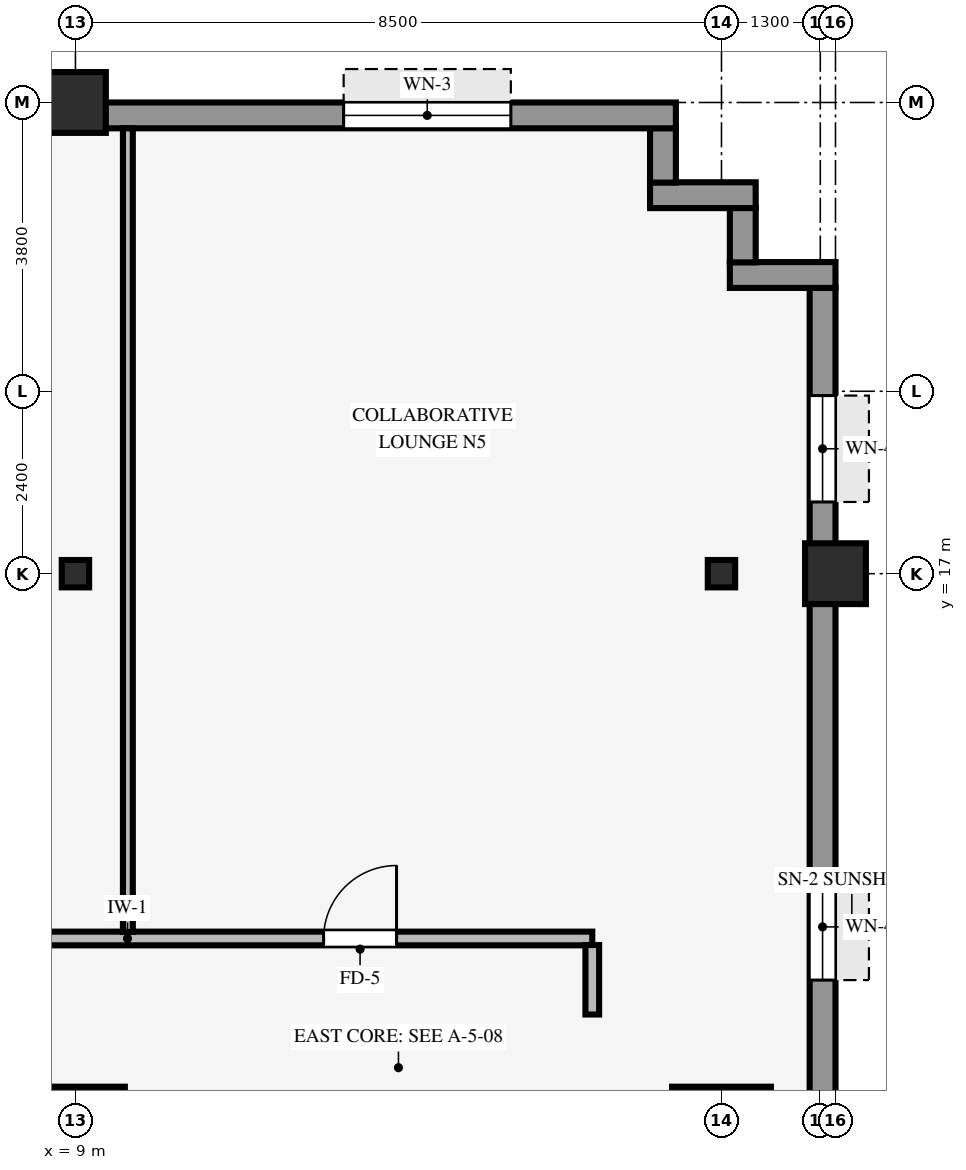
"""IFC4 building model, lengths in metres.
Left out: names, types, materials, properties, quantities, classifications, styles, units other than length and angle.
Written with IfcOpenShell. Run it as: python <this file> out.ifc"""

import sys

from ifc_helpers import new_model, si_unit, direction, frame, frame_2d, origin, origin_2d, place, context, subcontext, project, spatial, rectangle, hollow_rectangle, i_section, extrude, source, transform, mapped, element, fill, save


model = new_model("IFC4")
c1 = context("Model", 3, precision=1e-05, world=origin(), true_north=direction((0.0, 1.0)))
c2 = subcontext(c1, "Body", "Model", "MODEL_VIEW")
j1 = project(units=[si_unit("LENGTHUNIT", "METRE"), si_unit("PLANEANGLEUNIT", "RADIAN")], contexts=[c1])
p1 = place(None, origin())
s1 = spatial("IfcSite", under=j1, at=p1, CompositionType="ELEMENT")
p2 = place(p1, origin())
s2 = spatial("IfcBuilding", under=s1, at=p2, CompositionType="ELEMENT")
p3 = place(p2, frame((0.0, 0.0, 42.2)))
s3 = spatial("IfcBuildingStorey", under=s2, at=p3, CompositionType="ELEMENT", Elevation=42.2)
for number, where, z_axis, x_axis in (
    (1, (9.0, 9.6, 0.0), (0.0, 0.0, 1.0), (1.0, 0.0, 0.0)),
    (2, (17.5, 9.6, 0.0), (0.0, 0.0, 1.0), (1.0, 0.0, 0.0)),
):
    element("IfcColumn", number, at=place(p3, frame(where, z_axis=z_axis, x_axis=x_axis)), inside=s3, PredefinedType="COLUMN", context=c2, shape_type="SweptSolid", body=[
        extrude(rectangle(XDim=1.3, YDim=1.3, at=origin_2d()), origin(), (0.0, 0.0, 1.0), 3.37),
    ])
for number, where, z_axis, x_axis in (
    (3, (19.0, 17.0, 0.0), (0.0, 0.0, 1.0), (1.0, 0.0, 0.0)),
    (4, (9.0, 23.2, 0.0), (0.0, 0.0, 1.0), (1.0, 0.0, 0.0)),
):
    element("IfcColumn", number, at=place(p3, frame(where, z_axis=z_axis, x_axis=x_axis)), inside=s3, PredefinedType="COLUMN", context=c2, shape_type="SweptSolid", body=[
        extrude(hollow_rectangle(XDim=0.8, YDim=0.8, WallThickness=0.055, InnerFilletRadius=0.055, OuterFilletRadius=0.11, at=origin_2d()), origin(), (0.0, 0.0, 1.0), 3.37),
    ])
for number, where, z_axis, x_axis in (
    (5, (9.0, 17.0, 0.0), (0.0, 0.0, 1.0), (1.0, 0.0, 0.0)),
    (6, (17.5, 17.0, 0.0), (0.0, 0.0, 1.0), (1.0, 0.0, 0.0)),
):
    element("IfcColumn", number, at=place(p3, frame(where, z_axis=z_axis, x_axis=x_axis)), inside=s3, PredefinedType="COLUMN", context=c2, shape_type="SweptSolid", body=[
        extrude(i_section(OverallWidth=0.36, OverallDepth=0.36, WebThickness=0.021, FlangeThickness=0.021, FilletRadius=0.018, at=origin_2d()), origin(), (0.0, 0.0, 1.0), 3.37),
    ])
p4 = place(p3, frame((18.83, -20.764, 0.0), z_axis=(0.0, 0.0, 1.0), x_axis=(0.0, 1.0, 0.0)))
e7 = element("IfcWall", 7, at=p4, inside=s3, PredefinedType="STANDARD", context=c2, shape_type="SweptSolid", body=[
    extrude(rectangle(XDim=41.528, YDim=0.34, at=frame_2d((20.764, 0.0))), origin(), (0.0, 0.0, 1.0), 2.705),
])
p5 = place(p4, frame((7.914, 0.0, 0.0), z_axis=(0.0, 0.0, 1.0), x_axis=(-1.0, 0.0, 0.0)))
e8 = element("IfcOpeningElement", 8, at=p5, cuts=e7, PredefinedType="OPENING", context=c2, shape_type="SweptSolid", body=[
    extrude(rectangle(XDim=1.05, YDim=2.1, at=frame_2d((0.525, 1.05))), frame((0.0, 0.18, 0.0), z_axis=(0.0, -1.0, 0.0), x_axis=(1.0, 0.0, 0.0)), (0.0, 0.0, 1.0), 0.36),
])
p6 = place(p4, frame((1.42, 0.0, 0.8)))
e9 = element("IfcOpeningElement", 9, at=p6, cuts=e7, PredefinedType="OPENING", context=c2, shape_type="SweptSolid", body=[
    extrude(rectangle(XDim=1.4, YDim=1.65, at=frame_2d((0.7, 0.825))), frame((0.0, 0.18, 0.0), z_axis=(0.0, -1.0, 0.0), x_axis=(1.0, 0.0, 0.0)), (0.0, 0.0, 1.0), 0.36),
])
p7 = place(p4, frame((32.417, 0.0, 0.8)))
e10 = element("IfcOpeningElement", 10, at=p7, cuts=e7, PredefinedType="OPENING", context=c2, shape_type="SweptSolid", body=[
    extrude(rectangle(XDim=1.4, YDim=1.65, at=frame_2d((0.7, 0.825))), frame((0.0, 0.18, 0.0), z_axis=(0.0, -1.0, 0.0), x_axis=(1.0, 0.0, 0.0)), (0.0, 0.0, 1.0), 0.36),
])
p8 = place(p4, frame((38.708, 0.0, 0.8)))
e11 = element("IfcOpeningElement", 11, at=p8, cuts=e7, PredefinedType="OPENING", context=c2, shape_type="SweptSolid", body=[
    extrude(rectangle(XDim=1.4, YDim=1.65, at=frame_2d((0.7, 0.825))), frame((0.0, 0.18, 0.0), z_axis=(0.0, -1.0, 0.0), x_axis=(1.0, 0.0, 0.0)), (0.0, 0.0, 1.0), 0.36),
])
p9 = place(p3, frame((17.61, 20.93, 0.0), z_axis=(0.0, 0.0, 1.0), x_axis=(1.0, 0.0, 0.0)))
e12 = element("IfcWall", 12, at=p9, inside=s3, PredefinedType="STANDARD", context=c2, shape_type="SweptSolid", body=[
    extrude(rectangle(XDim=1.39, YDim=0.34, at=frame_2d((0.695, 0.0))), origin(), (0.0, 0.0, 1.0), 3.36),
])
p10 = place(p3, frame((17.78, 21.096, 0.0), z_axis=(0.0, 0.0, 1.0), x_axis=(0.0, 1.0, 0.0)))
e13 = element("IfcWall", 13, at=p10, inside=s3, PredefinedType="STANDARD", context=c2, shape_type="SweptSolid", body=[
    extrude(rectangle(XDim=0.718, YDim=0.34, at=frame_2d((0.359, 0.0))), origin(), (0.0, 0.0, 1.0), 3.36),
])
p11 = place(p3, frame((16.56, 21.98, 0.0), z_axis=(0.0, 0.0, 1.0), x_axis=(1.0, 0.0, 0.0)))
e14 = element("IfcWall", 14, at=p11, inside=s3, PredefinedType="STANDARD", context=c2, shape_type="SweptSolid", body=[
    extrude(rectangle(XDim=1.39, YDim=0.34, at=frame_2d((0.695, 0.0))), origin(), (0.0, 0.0, 1.0), 3.36),
])
p12 = place(p3, frame((16.73, 22.146, 0.0), z_axis=(0.0, 0.0, 1.0), x_axis=(0.0, 1.0, 0.0)))
e15 = element("IfcWall", 15, at=p12, inside=s3, PredefinedType="STANDARD", context=c2, shape_type="SweptSolid", body=[
    extrude(rectangle(XDim=0.718, YDim=0.34, at=frame_2d((0.359, 0.0))), origin(), (0.0, 0.0, 1.0), 3.36),
])
p13 = place(p3, frame((-16.9, 23.03, 0.0), z_axis=(0.0, 0.0, 1.0), x_axis=(1.0, 0.0, 0.0)))
e16 = element("IfcWall", 16, at=p13, inside=s3, PredefinedType="STANDARD", context=c2, shape_type="SweptSolid", body=[
    extrude(rectangle(XDim=33.8, YDim=0.34, at=frame_2d((16.9, 0.0))), origin(), (0.0, 0.0, 1.0), 2.705),
])
p14 = place(p13, frame((1.271, 0.0, 0.8)))
e17 = element("IfcOpeningElement", 17, at=p14, cuts=e16, PredefinedType="OPENING", context=c2, shape_type="SweptSolid", body=[
    extrude(rectangle(XDim=2.2, YDim=1.65, at=frame_2d((1.1, 0.825))), frame((0.0, 0.18, 0.0), z_axis=(0.0, -1.0, 0.0), x_axis=(1.0, 0.0, 0.0)), (0.0, 0.0, 1.0), 0.36),
])
p15 = place(p13, frame((11.257, 0.0, 0.8)))
e18 = element("IfcOpeningElement", 18, at=p15, cuts=e16, PredefinedType="OPENING", context=c2, shape_type="SweptSolid", body=[
    extrude(rectangle(XDim=2.2, YDim=1.65, at=frame_2d((1.1, 0.825))), frame((0.0, 0.18, 0.0), z_axis=(0.0, -1.0, 0.0), x_axis=(1.0, 0.0, 0.0)), (0.0, 0.0, 1.0), 0.36),
])
p16 = place(p13, frame((20.793, 0.0, 0.8)))
e19 = element("IfcOpeningElement", 19, at=p16, cuts=e16, PredefinedType="OPENING", context=c2, shape_type="SweptSolid", body=[
    extrude(rectangle(XDim=2.2, YDim=1.65, at=frame_2d((1.1, 0.825))), frame((0.0, 0.18, 0.0), z_axis=(0.0, -1.0, 0.0), x_axis=(1.0, 0.0, 0.0)), (0.0, 0.0, 1.0), 0.36),
])
p17 = place(p13, frame((29.429, 0.0, 0.8)))
e20 = element("IfcOpeningElement", 20, at=p17, cuts=e16, PredefinedType="OPENING", context=c2, shape_type="SweptSolid", body=[
    extrude(rectangle(XDim=2.2, YDim=1.65, at=frame_2d((1.1, 0.825))), frame((0.0, 0.18, 0.0), z_axis=(0.0, -1.0, 0.0), x_axis=(1.0, 0.0, 0.0)), (0.0, 0.0, 1.0), 0.36),
])
p18 = place(p3, frame((-15.8, 12.2, 0.0), z_axis=(0.0, 0.0, 1.0), x_axis=(1.0, 0.0, 0.0)))
e21 = element("IfcWall", 21, at=p18, inside=s3, PredefinedType="PARTITIONING", context=c2, shape_type="SweptSolid", body=[
    extrude(rectangle(XDim=31.6, YDim=0.18, at=frame_2d((15.8, 0.0))), origin(), (0.0, 0.0, 1.0), 3.36),
])
p19 = place(p18, frame((21.945, 0.0, 0.0)))
e22 = element("IfcOpeningElement", 22, at=p19, cuts=e21, PredefinedType="OPENING", context=c2, shape_type="SweptSolid", body=[
    extrude(rectangle(XDim=0.96, YDim=2.1, at=frame_2d((0.48, 1.05))), frame((0.0, 0.1, 0.0), z_axis=(0.0, -1.0, 0.0), x_axis=(1.0, 0.0, 0.0)), (0.0, 0.0, 1.0), 0.2),
])
p20 = place(p18, frame((28.065, 0.0, 0.0)))
e23 = element("IfcOpeningElement", 23, at=p20, cuts=e21, PredefinedType="OPENING", context=c2, shape_type="SweptSolid", body=[
    extrude(rectangle(XDim=0.96, YDim=2.1, at=frame_2d((0.48, 1.05))), frame((0.0, 0.1, 0.0), z_axis=(0.0, -1.0, 0.0), x_axis=(1.0, 0.0, 0.0)), (0.0, 0.0, 1.0), 0.2),
])
p21 = place(p18, frame((16.7, 0.0, 0.0)))
e24 = element("IfcOpeningElement", 24, at=p21, cuts=e21, PredefinedType="OPENING", context=c2, shape_type="SweptSolid", body=[
    extrude(rectangle(XDim=0.96, YDim=2.1, at=frame_2d((0.48, 1.05))), frame((0.0, 0.1, 0.0), z_axis=(0.0, -1.0, 0.0), x_axis=(1.0, 0.0, 0.0)), (0.0, 0.0, 1.0), 0.2),
])
p22 = place(p18, frame((0.92, 0.0, 0.0)))
e25 = element("IfcOpeningElement", 25, at=p22, cuts=e21, PredefinedType="OPENING", context=c2, shape_type="SweptSolid", body=[
    extrude(rectangle(XDim=0.96, YDim=2.1, at=frame_2d((0.48, 1.05))), frame((0.0, 0.1, 0.0), z_axis=(0.0, -1.0, 0.0), x_axis=(1.0, 0.0, 0.0)), (0.0, 0.0, 1.0), 0.2),
])
p23 = place(p18, frame((6.25, 0.0, 0.0)))
e26 = element("IfcOpeningElement", 26, at=p23, cuts=e21, PredefinedType="OPENING", context=c2, shape_type="SweptSolid", body=[
    extrude(rectangle(XDim=0.9, YDim=2.1, at=frame_2d((0.45, 1.05))), frame((0.0, 0.1, 0.0), z_axis=(0.0, -1.0, 0.0), x_axis=(1.0, 0.0, 0.0)), (0.0, 0.0, 1.0), 0.2),
])
p24 = place(p18, frame((3.65, 0.0, 0.0)))
e27 = element("IfcOpeningElement", 27, at=p24, cuts=e21, PredefinedType="OPENING", context=c2, shape_type="SweptSolid", body=[
    extrude(rectangle(XDim=0.9, YDim=2.1, at=frame_2d((0.45, 1.05))), frame((0.0, 0.1, 0.0), z_axis=(0.0, -1.0, 0.0), x_axis=(1.0, 0.0, 0.0)), (0.0, 0.0, 1.0), 0.2),
])
p25 = place(p18, frame((13.32, 0.0, 0.0)))
e28 = element("IfcOpeningElement", 28, at=p25, cuts=e21, PredefinedType="OPENING", context=c2, shape_type="SweptSolid", body=[
    extrude(rectangle(XDim=0.96, YDim=2.1, at=frame_2d((0.48, 1.05))), frame((0.0, 0.1, 0.0), z_axis=(0.0, -1.0, 0.0), x_axis=(1.0, 0.0, 0.0)), (0.0, 0.0, 1.0), 0.2),
])
p26 = place(p18, frame((8.75, 0.0, 0.0)))
e29 = element("IfcOpeningElement", 29, at=p26, cuts=e21, PredefinedType="OPENING", context=c2, shape_type="SweptSolid", body=[
    extrude(rectangle(XDim=0.9, YDim=2.1, at=frame_2d((0.45, 1.05))), frame((0.0, 0.1, 0.0), z_axis=(0.0, -1.0, 0.0), x_axis=(1.0, 0.0, 0.0)), (0.0, 0.0, 1.0), 0.2),
])
p27 = place(p3, frame((9.69, 12.286, 0.0), z_axis=(0.0, 0.0, 1.0), x_axis=(0.0, 1.0, 0.0)))
e30 = element("IfcWall", 30, at=p27, inside=s3, PredefinedType="PARTITIONING", context=c2, shape_type="SweptSolid", body=[
    extrude(rectangle(XDim=10.574, YDim=0.13, at=frame_2d((5.287, 0.0))), origin(), (0.0, 0.0, 1.0), 3.36),
])
p28 = place(p3, frame((15.8, 11.2, 0.0), z_axis=(0.0, 0.0, 1.0), x_axis=(0.0, 1.0, 0.0)))
e31 = element("IfcWall", 31, at=p28, inside=s3, PredefinedType="PARTITIONING", context=c2, shape_type="SweptSolid", body=[
    extrude(rectangle(XDim=0.914, YDim=0.18, at=frame_2d((0.457, 0.0))), origin(), (0.0, 0.0, 1.0), 3.36),
])
m1 = source(origin(), c2, "Body", "SweptSolid", [
    extrude(rectangle(XDim=1.4, YDim=1.65, at=frame_2d((0.7, 0.825))), frame((0.0, 0.03, 0.0), z_axis=(0.0, -1.0, 0.0), x_axis=(1.0, 0.0, 0.0)), (0.0, 0.0, 1.0), 0.06),
])
p29 = place(p7, origin())
e32 = element("IfcWindow", 32, at=p29, inside=s3, PartitioningType="SINGLE_PANEL", PredefinedType="WINDOW", context=c2, shape_type="MappedRepresentation", body=[
    mapped(m1, transform((0.0, 0.0, 0.0), scale=1.0)),
])
fill(e10, e32)
p30 = place(p8, origin())
e33 = element("IfcWindow", 33, at=p30, inside=s3, PartitioningType="SINGLE_PANEL", PredefinedType="WINDOW", context=c2, shape_type="MappedRepresentation", body=[
    mapped(m1, transform((0.0, 0.0, 0.0), scale=1.0)),
])
fill(e11, e33)
m2 = source(origin(), c2, "Body", "SweptSolid", [
    extrude(rectangle(XDim=2.2, YDim=1.65, at=frame_2d((1.1, 0.825))), frame((0.0, 0.03, 0.0), z_axis=(0.0, -1.0, 0.0), x_axis=(1.0, 0.0, 0.0)), (0.0, 0.0, 1.0), 0.06),
])
p31 = place(p17, origin())
e34 = element("IfcWindow", 34, at=p31, inside=s3, PartitioningType="SINGLE_PANEL", PredefinedType="WINDOW", context=c2, shape_type="MappedRepresentation", body=[
    mapped(m2, transform((0.0, 0.0, 0.0), scale=1.0)),
])
fill(e20, e34)
m3 = source(origin(), c2, "Body", "SweptSolid", [
    extrude(rectangle(XDim=0.96, YDim=2.1, at=frame_2d((0.48, 1.05))), frame((0.0, 0.025, 0.0), z_axis=(0.0, -1.0, 0.0), x_axis=(1.0, 0.0, 0.0)), (0.0, 0.0, 1.0), 0.05),
])
p32 = place(p20, origin())
e35 = element("IfcDoor", 35, at=p32, inside=s3, OperationType="SINGLE_SWING_RIGHT", PredefinedType="DOOR", context=c2, shape_type="MappedRepresentation", body=[
    mapped(m3, transform((0.0, 0.0, 0.0), scale=1.0)),
])
fill(e23, e35)
save(model, sys.argv[1])
